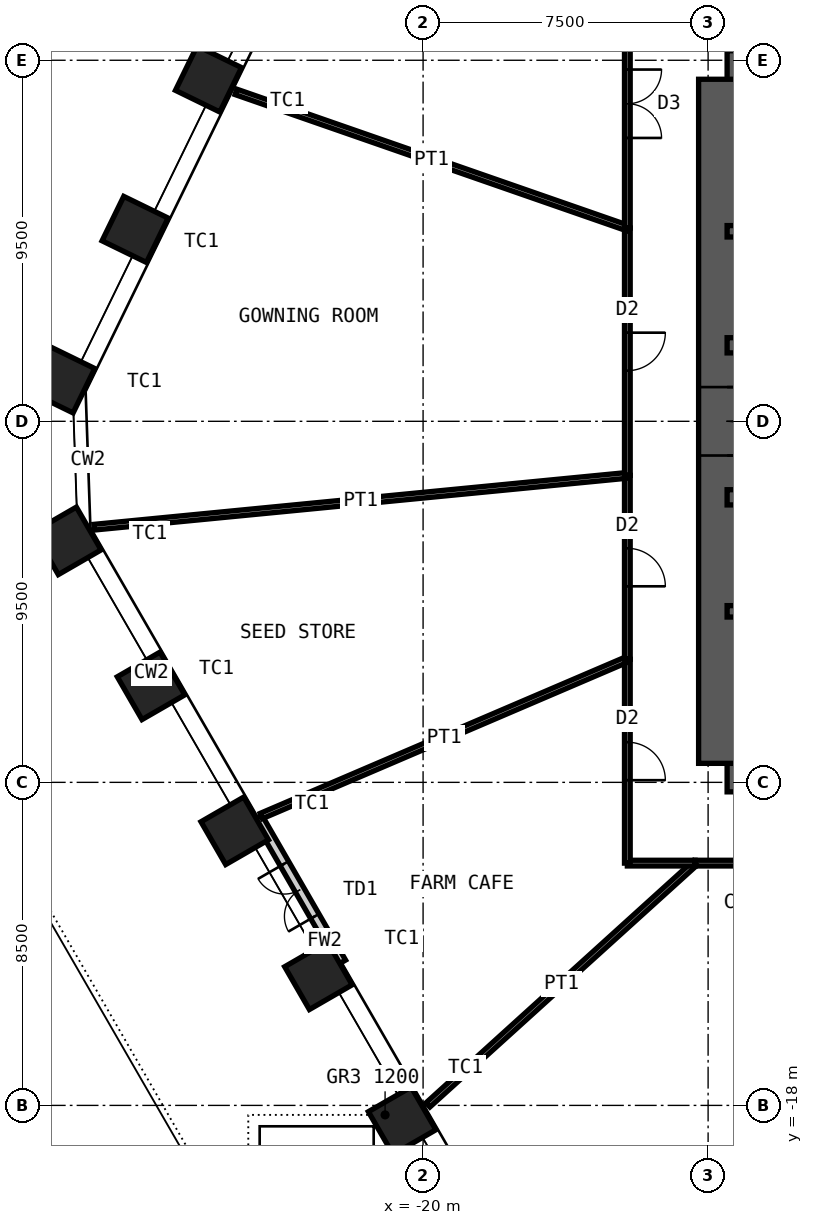
"""IFC4 building model, lengths in metres.
Left out: names, types, materials, properties, quantities, classifications, styles, units other than length and angle.
Written with IfcOpenShell. Run it as: python <this file> out.ifc"""

import sys

from ifc_helpers import new_model, si_unit, direction, frame, frame_2d, origin, origin_2d, place, context, subcontext, project, spatial, rectangle, hollow_rectangle, extrude, element, fill, save


model = new_model("IFC4")
c1 = context("Model", 3, precision=1e-05, world=origin(), true_north=direction((0.0, 1.0)))
c2 = subcontext(c1, "Body", "Model", "MODEL_VIEW")
j1 = project(units=[si_unit("LENGTHUNIT", "METRE"), si_unit("PLANEANGLEUNIT", "RADIAN")], contexts=[c1])
p1 = place(None, origin())
s1 = spatial("IfcSite", under=j1, at=p1, CompositionType="ELEMENT")
p2 = place(p1, origin())
s2 = spatial("IfcBuilding", under=s1, at=p2, CompositionType="ELEMENT")
p3 = place(p2, frame((0.0, 0.0, 17.0)))
s3 = spatial("IfcBuildingStorey", under=s2, at=p3, CompositionType="ELEMENT", Elevation=17.0)
for number, where, z_axis, x_axis in (
    (1, (-20.552, -18.404, 0.0), (0.0, 0.0, 1.0), (0.5, -0.866, 0.0)),
    (2, (-22.754, -14.589, 0.0), (0.0, 0.0, 1.0), (0.5, -0.866, 0.0)),
    (3, (-24.956, -10.775, 0.0), (0.0, 0.0, 1.0), (0.5, -0.866, 0.0)),
    (4, (-27.158, -6.96, 0.0), (0.0, 0.0, 1.0), (0.5, -0.866, 0.0)),
    (5, (-29.361, -3.146, 0.0), (0.0, 0.0, 1.0), (0.5, -0.866, 0.0)),
    (6, (-29.509, 1.09, 0.0), (0.0, 0.0, 1.0), (-0.438, -0.899, 0.0)),
    (7, (-27.578, 5.049, 0.0), (0.0, 0.0, 1.0), (-0.438, -0.899, 0.0)),
    (8, (-25.647, 9.008, 0.0), (0.0, 0.0, 1.0), (-0.438, -0.899, 0.0)),
):
    element("IfcColumn", number, at=place(p3, frame(where, z_axis=z_axis, x_axis=x_axis)), inside=s3, PredefinedType="COLUMN", context=c2, shape_type="SweptSolid", body=[
        extrude(hollow_rectangle(XDim=1.3, YDim=1.3, WallThickness=0.1, at=origin_2d()), origin(), (0.0, 0.0, 1.0), 5.0),
    ])
p4 = place(p3, frame((-12.0, 9.0, 0.0), z_axis=(0.0, 0.0, 1.0), x_axis=(1.0, 0.0, 0.0)))
e9 = element("IfcWall", 9, at=p4, inside=s3, PredefinedType="SHEAR", context=c2, shape_type="SweptSolid", body=[
    extrude(rectangle(XDim=24.0, YDim=1.5, at=frame_2d((12.0, 0.0))), origin(), (0.0, 0.0, 1.0), 5.0),
])
p5 = place(p4, frame((10.4, 0.0, 0.0)))
e10 = element("IfcOpeningElement", 10, at=p5, cuts=e9, PredefinedType="OPENING", context=c2, shape_type="SweptSolid", body=[
    extrude(rectangle(XDim=1.0, YDim=2.1, at=frame_2d((0.5, 1.05))), frame((0.0, 0.76, 0.0), z_axis=(0.0, -1.0, 0.0), x_axis=(1.0, 0.0, 0.0)), (0.0, 0.0, 1.0), 1.52),
])
p6 = place(p4, frame((17.6, 0.0, 0.0)))
e11 = element("IfcOpeningElement", 11, at=p6, cuts=e9, PredefinedType="OPENING", context=c2, shape_type="SweptSolid", body=[
    extrude(rectangle(XDim=0.9, YDim=2.1, at=frame_2d((0.45, 1.05))), frame((0.0, 0.76, 0.0), z_axis=(0.0, -1.0, 0.0), x_axis=(1.0, 0.0, 0.0)), (0.0, 0.0, 1.0), 1.52),
])
p7 = place(p4, frame((21.9, 0.0, 0.0)))
e12 = element("IfcOpeningElement", 12, at=p7, cuts=e9, PredefinedType="OPENING", context=c2, shape_type="SweptSolid", body=[
    extrude(rectangle(XDim=0.9, YDim=2.1, at=frame_2d((0.45, 1.05))), frame((0.0, 0.76, 0.0), z_axis=(0.0, -1.0, 0.0), x_axis=(1.0, 0.0, 0.0)), (0.0, 0.0, 1.0), 1.52),
])
p8 = place(p3, frame((-12.0, -9.0, 0.0), z_axis=(0.0, 0.0, 1.0), x_axis=(1.0, 0.0, 0.0)))
e13 = element("IfcWall", 13, at=p8, inside=s3, PredefinedType="SHEAR", context=c2, shape_type="SweptSolid", body=[
    extrude(rectangle(XDim=24.0, YDim=1.5, at=frame_2d((12.0, 0.0))), origin(), (0.0, 0.0, 1.0), 5.0),
])
p9 = place(p8, frame((1.35, 0.0, 0.0)))
e14 = element("IfcOpeningElement", 14, at=p9, cuts=e13, PredefinedType="OPENING", context=c2, shape_type="SweptSolid", body=[
    extrude(rectangle(XDim=1.0, YDim=2.1, at=frame_2d((0.5, 1.05))), frame((0.0, 0.76, 0.0), z_axis=(0.0, -1.0, 0.0), x_axis=(1.0, 0.0, 0.0)), (0.0, 0.0, 1.0), 1.52),
])
p10 = place(p8, frame((5.325, 0.0, 0.0)))
e15 = element("IfcOpeningElement", 15, at=p10, cuts=e13, PredefinedType="OPENING", context=c2, shape_type="SweptSolid", body=[
    extrude(rectangle(XDim=1.15, YDim=2.1, at=frame_2d((0.575, 1.05))), frame((0.0, 0.76, 0.0), z_axis=(0.0, -1.0, 0.0), x_axis=(1.0, 0.0, 0.0)), (0.0, 0.0, 1.0), 1.52),
])
p11 = place(p8, frame((12.6, 0.0, 0.0)))
e16 = element("IfcOpeningElement", 16, at=p11, cuts=e13, PredefinedType="OPENING", context=c2, shape_type="SweptSolid", body=[
    extrude(rectangle(XDim=1.0, YDim=2.1, at=frame_2d((0.5, 1.05))), frame((0.0, 0.76, 0.0), z_axis=(0.0, -1.0, 0.0), x_axis=(1.0, 0.0, 0.0)), (0.0, 0.0, 1.0), 1.52),
])
p12 = place(p3, frame((-12.0, -9.0, 0.0), z_axis=(0.0, 0.0, 1.0), x_axis=(0.0, 1.0, 0.0)))
e17 = element("IfcWall", 17, at=p12, inside=s3, PredefinedType="SHEAR", context=c2, shape_type="SweptSolid", body=[
    extrude(rectangle(XDim=18.0, YDim=1.5, at=frame_2d((9.0, 0.0))), origin(), (0.0, 0.0, 1.0), 5.0),
])
p13 = place(p12, frame((8.1, 0.0, 0.0)))
e18 = element("IfcOpeningElement", 18, at=p13, cuts=e17, PredefinedType="OPENING", context=c2, shape_type="SweptSolid", body=[
    extrude(rectangle(XDim=1.8, YDim=2.1, at=frame_2d((0.9, 1.05))), frame((0.0, 0.76, 0.0), z_axis=(0.0, -1.0, 0.0), x_axis=(1.0, 0.0, 0.0)), (0.0, 0.0, 1.0), 1.52),
])
p14 = place(p3, frame((-12.0, 5.0, 0.0), z_axis=(0.0, 0.0, 1.0), x_axis=(1.0, 0.0, 0.0)))
e19 = element("IfcWall", 19, at=p14, inside=s3, PredefinedType="SHEAR", context=c2, shape_type="SweptSolid", body=[
    extrude(rectangle(XDim=24.0, YDim=0.3, at=frame_2d((12.0, 0.0))), origin(), (0.0, 0.0, 1.0), 5.0),
])
p15 = place(p3, frame((-12.0, 2.0, 0.0), z_axis=(0.0, 0.0, 1.0), x_axis=(1.0, 0.0, 0.0)))
e20 = element("IfcWall", 20, at=p15, inside=s3, PredefinedType="SHEAR", context=c2, shape_type="SweptSolid", body=[
    extrude(rectangle(XDim=24.0, YDim=0.4, at=frame_2d((12.0, 0.0))), origin(), (0.0, 0.0, 1.0), 5.0),
])
p16 = place(p15, frame((2.4, 0.0, 0.0)))
e21 = element("IfcOpeningElement", 21, at=p16, cuts=e20, PredefinedType="OPENING", context=c2, shape_type="SweptSolid", body=[
    extrude(rectangle(XDim=1.1, YDim=2.1, at=frame_2d((0.55, 1.05))), frame((0.0, 0.21, 0.0), z_axis=(0.0, -1.0, 0.0), x_axis=(1.0, 0.0, 0.0)), (0.0, 0.0, 1.0), 0.42),
])
p17 = place(p15, frame((22.0, 0.0, 0.0)))
e22 = element("IfcOpeningElement", 22, at=p17, cuts=e20, PredefinedType="OPENING", context=c2, shape_type="SweptSolid", body=[
    extrude(rectangle(XDim=1.1, YDim=2.1, at=frame_2d((0.55, 1.05))), frame((0.0, 0.21, 0.0), z_axis=(0.0, -1.0, 0.0), x_axis=(1.0, 0.0, 0.0)), (0.0, 0.0, 1.0), 0.42),
])
p18 = place(p15, frame((10.15, 0.0, 0.0)))
e23 = element("IfcOpeningElement", 23, at=p18, cuts=e20, PredefinedType="OPENING", context=c2, shape_type="SweptSolid", body=[
    extrude(rectangle(XDim=1.0, YDim=2.1, at=frame_2d((0.5, 1.05))), frame((0.0, 0.21, 0.0), z_axis=(0.0, -1.0, 0.0), x_axis=(1.0, 0.0, 0.0)), (0.0, 0.0, 1.0), 0.42),
])
p19 = place(p15, frame((6.7, 0.0, 0.0)))
e24 = element("IfcOpeningElement", 24, at=p19, cuts=e20, PredefinedType="OPENING", context=c2, shape_type="SweptSolid", body=[
    extrude(rectangle(XDim=1.4, YDim=2.4, at=frame_2d((0.7, 1.2))), frame((0.0, 0.21, 0.0), z_axis=(0.0, -1.0, 0.0), x_axis=(1.0, 0.0, 0.0)), (0.0, 0.0, 1.0), 0.42),
])
p20 = place(p15, frame((13.35, 0.0, 0.0)))
e25 = element("IfcOpeningElement", 25, at=p20, cuts=e20, PredefinedType="OPENING", context=c2, shape_type="SweptSolid", body=[
    extrude(rectangle(XDim=1.1, YDim=2.4, at=frame_2d((0.55, 1.2))), frame((0.0, 0.21, 0.0), z_axis=(0.0, -1.0, 0.0), x_axis=(1.0, 0.0, 0.0)), (0.0, 0.0, 1.0), 0.42),
])
p21 = place(p15, frame((16.15, 0.0, 0.0)))
e26 = element("IfcOpeningElement", 26, at=p21, cuts=e20, PredefinedType="OPENING", context=c2, shape_type="SweptSolid", body=[
    extrude(rectangle(XDim=1.1, YDim=2.4, at=frame_2d((0.55, 1.2))), frame((0.0, 0.21, 0.0), z_axis=(0.0, -1.0, 0.0), x_axis=(1.0, 0.0, 0.0)), (0.0, 0.0, 1.0), 0.42),
])
p22 = place(p15, frame((18.95, 0.0, 0.0)))
e27 = element("IfcOpeningElement", 27, at=p22, cuts=e20, PredefinedType="OPENING", context=c2, shape_type="SweptSolid", body=[
    extrude(rectangle(XDim=1.1, YDim=2.4, at=frame_2d((0.55, 1.2))), frame((0.0, 0.21, 0.0), z_axis=(0.0, -1.0, 0.0), x_axis=(1.0, 0.0, 0.0)), (0.0, 0.0, 1.0), 0.42),
])
p23 = place(p3, frame((-12.0, -2.0, 0.0), z_axis=(0.0, 0.0, 1.0), x_axis=(1.0, 0.0, 0.0)))
e28 = element("IfcWall", 28, at=p23, inside=s3, PredefinedType="SHEAR", context=c2, shape_type="SweptSolid", body=[
    extrude(rectangle(XDim=24.0, YDim=0.4, at=frame_2d((12.0, 0.0))), origin(), (0.0, 0.0, 1.0), 5.0),
])
p24 = place(p23, frame((1.1, 0.0, 0.0)))
e29 = element("IfcOpeningElement", 29, at=p24, cuts=e28, PredefinedType="OPENING", context=c2, shape_type="SweptSolid", body=[
    extrude(rectangle(XDim=1.1, YDim=2.1, at=frame_2d((0.55, 1.05))), frame((0.0, 0.21, 0.0), z_axis=(0.0, -1.0, 0.0), x_axis=(1.0, 0.0, 0.0)), (0.0, 0.0, 1.0), 0.42),
])
p25 = place(p23, frame((13.55, 0.0, 0.0)))
e30 = element("IfcOpeningElement", 30, at=p25, cuts=e28, PredefinedType="OPENING", context=c2, shape_type="SweptSolid", body=[
    extrude(rectangle(XDim=1.1, YDim=2.1, at=frame_2d((0.55, 1.05))), frame((0.0, 0.21, 0.0), z_axis=(0.0, -1.0, 0.0), x_axis=(1.0, 0.0, 0.0)), (0.0, 0.0, 1.0), 0.42),
])
p26 = place(p23, frame((20.7, 0.0, 0.0)))
e31 = element("IfcOpeningElement", 31, at=p26, cuts=e28, PredefinedType="OPENING", context=c2, shape_type="SweptSolid", body=[
    extrude(rectangle(XDim=1.1, YDim=2.1, at=frame_2d((0.55, 1.05))), frame((0.0, 0.21, 0.0), z_axis=(0.0, -1.0, 0.0), x_axis=(1.0, 0.0, 0.0)), (0.0, 0.0, 1.0), 0.42),
])
p27 = place(p3, frame((-12.0, -5.0, 0.0), z_axis=(0.0, 0.0, 1.0), x_axis=(1.0, 0.0, 0.0)))
e32 = element("IfcWall", 32, at=p27, inside=s3, PredefinedType="SHEAR", context=c2, shape_type="SweptSolid", body=[
    extrude(rectangle(XDim=24.0, YDim=0.3, at=frame_2d((12.0, 0.0))), origin(), (0.0, 0.0, 1.0), 5.0),
])
p28 = place(p3, frame((-22.148, -14.239, 0.0), z_axis=(0.0, 0.0, 1.0), x_axis=(-0.499954356739, 0.86605175433, 0.0)))
e33 = element("IfcWall", 33, at=p28, inside=s3, PredefinedType="SOLIDWALL", context=c2, shape_type="SweptSolid", body=[
    extrude(rectangle(XDim=4.405, YDim=0.25, at=frame_2d((2.202, 0.0))), origin(), (0.0, 0.0, 1.0), 4.8),
])
p29 = place(p28, frame((1.402, 0.0, 0.0)))
e34 = element("IfcOpeningElement", 34, at=p29, cuts=e33, PredefinedType="OPENING", context=c2, shape_type="SweptSolid", body=[
    extrude(rectangle(XDim=1.6, YDim=2.4, at=frame_2d((0.8, 1.2))), frame((0.0, 0.135, 0.0), z_axis=(0.0, -1.0, 0.0), x_axis=(1.0, 0.0, 0.0)), (0.0, 0.0, 1.0), 0.27),
])
p30 = place(p3, frame((-12.56, -27.155, 0.0), z_axis=(0.0, 0.0, 1.0), x_axis=(0.419799104875, 0.907617051154, 0.0)))
e35 = element("IfcWall", 35, at=p30, inside=s3, PredefinedType="PARTITIONING", context=c2, shape_type="SweptSolid", body=[
    extrude(rectangle(XDim=17.11, YDim=0.15, at=frame_2d((8.555, 0.0))), origin(), (0.0, 0.0, 1.0), 3.7),
])
p31 = place(p3, frame((-5.377, -11.625, 0.0), z_axis=(0.0, 0.0, 1.0), x_axis=(-1.0, 0.0, 0.0)))
e36 = element("IfcWall", 36, at=p31, inside=s3, PredefinedType="PARTITIONING", context=c2, shape_type="SweptSolid", body=[
    extrude(rectangle(XDim=7.466, YDim=0.15, at=frame_2d((3.733, 0.0))), origin(), (0.0, 0.0, 1.0), 4.8),
])
p32 = place(p31, frame((3.233, 0.0, 0.0)))
e37 = element("IfcOpeningElement", 37, at=p32, cuts=e36, PredefinedType="OPENING", context=c2, shape_type="SweptSolid", body=[
    extrude(rectangle(XDim=1.0, YDim=2.4, at=frame_2d((0.5, 1.2))), frame((0.0, 0.085, 0.0), z_axis=(0.0, -1.0, 0.0), x_axis=(1.0, 0.0, 0.0)), (0.0, 0.0, 1.0), 0.17),
])
p33 = place(p3, frame((-19.871, -17.987, 0.0), z_axis=(0.0, 0.0, 1.0), x_axis=(0.741386887315, 0.671077851905, 0.0)))
e38 = element("IfcWall", 38, at=p33, inside=s3, PredefinedType="PARTITIONING", context=c2, shape_type="SweptSolid", body=[
    extrude(rectangle(XDim=9.48, YDim=0.15, at=frame_2d((4.74, 0.0))), origin(), (0.0, 0.0, 1.0), 3.7),
])
p34 = place(p3, frame((-12.843, -11.625, 0.0), z_axis=(0.0, 0.0, 1.0), x_axis=(-1.0, 0.0, 0.0)))
e39 = element("IfcWall", 39, at=p34, inside=s3, PredefinedType="PARTITIONING", context=c2, shape_type="SweptSolid", body=[
    extrude(rectangle(XDim=1.782, YDim=0.15, at=frame_2d((0.891, 0.0))), origin(), (0.0, 0.0, 1.0), 4.8),
])
p35 = place(p3, frame((-14.625, -11.625, 0.0), z_axis=(0.0, 0.0, 1.0), x_axis=(0.0, 1.0, 0.0)))
e40 = element("IfcWall", 40, at=p35, inside=s3, PredefinedType="PARTITIONING", context=c2, shape_type="SweptSolid", body=[
    extrude(rectangle(XDim=5.364, YDim=0.15, at=frame_2d((2.682, 0.0))), origin(), (0.0, 0.0, 1.0), 4.8),
])
p36 = place(p35, frame((2.182, 0.0, 0.0)))
e41 = element("IfcOpeningElement", 41, at=p36, cuts=e40, PredefinedType="OPENING", context=c2, shape_type="SweptSolid", body=[
    extrude(rectangle(XDim=1.0, YDim=2.4, at=frame_2d((0.5, 1.2))), frame((0.0, 0.085, 0.0), z_axis=(0.0, -1.0, 0.0), x_axis=(1.0, 0.0, 0.0)), (0.0, 0.0, 1.0), 0.17),
])
p37 = place(p3, frame((-24.258, -10.385, 0.0), z_axis=(0.0, 0.0, 1.0), x_axis=(0.919298009201, 0.393562155547, 0.0)))
e42 = element("IfcWall", 42, at=p37, inside=s3, PredefinedType="PARTITIONING", context=c2, shape_type="SweptSolid", body=[
    extrude(rectangle(XDim=10.479, YDim=0.15, at=frame_2d((5.239, 0.0))), origin(), (0.0, 0.0, 1.0), 3.7),
])
p38 = place(p3, frame((-14.625, -6.261, 0.0), z_axis=(0.0, 0.0, 1.0), x_axis=(0.0, 1.0, 0.0)))
e43 = element("IfcWall", 43, at=p38, inside=s3, PredefinedType="PARTITIONING", context=c2, shape_type="SweptSolid", body=[
    extrude(rectangle(XDim=4.839, YDim=0.15, at=frame_2d((2.42, 0.0))), origin(), (0.0, 0.0, 1.0), 4.8),
])
p39 = place(p38, frame((1.92, 0.0, 0.0)))
e44 = element("IfcOpeningElement", 44, at=p39, cuts=e43, PredefinedType="OPENING", context=c2, shape_type="SweptSolid", body=[
    extrude(rectangle(XDim=1.0, YDim=2.4, at=frame_2d((0.5, 1.2))), frame((0.0, 0.085, 0.0), z_axis=(0.0, -1.0, 0.0), x_axis=(1.0, 0.0, 0.0)), (0.0, 0.0, 1.0), 0.17),
])
p40 = place(p3, frame((-28.655, -2.786, 0.0), z_axis=(0.0, 0.0, 1.0), x_axis=(0.995307277605, 0.096764782571, 0.0)))
e45 = element("IfcWall", 45, at=p40, inside=s3, PredefinedType="PARTITIONING", context=c2, shape_type="SweptSolid", body=[
    extrude(rectangle(XDim=14.096, YDim=0.15, at=frame_2d((7.048, 0.0))), origin(), (0.0, 0.0, 1.0), 3.7),
])
p41 = place(p3, frame((-14.625, -1.422, 0.0), z_axis=(0.0, 0.0, 1.0), x_axis=(0.0, 1.0, 0.0)))
e46 = element("IfcWall", 46, at=p41, inside=s3, PredefinedType="PARTITIONING", context=c2, shape_type="SweptSolid", body=[
    extrude(rectangle(XDim=6.508, YDim=0.15, at=frame_2d((3.254, 0.0))), origin(), (0.0, 0.0, 1.0), 4.8),
])
p42 = place(p41, frame((2.754, 0.0, 0.0)))
e47 = element("IfcOpeningElement", 47, at=p42, cuts=e46, PredefinedType="OPENING", context=c2, shape_type="SweptSolid", body=[
    extrude(rectangle(XDim=1.0, YDim=2.4, at=frame_2d((0.5, 1.2))), frame((0.0, 0.085, 0.0), z_axis=(0.0, -1.0, 0.0), x_axis=(1.0, 0.0, 0.0)), (0.0, 0.0, 1.0), 0.17),
])
p43 = place(p3, frame((-24.923, 8.668, 0.0), z_axis=(0.0, 0.0, 1.0), x_axis=(0.944503744172, -0.328500650295, 0.0)))
e48 = element("IfcWall", 48, at=p43, inside=s3, PredefinedType="PARTITIONING", context=c2, shape_type="SweptSolid", body=[
    extrude(rectangle(XDim=10.903, YDim=0.15, at=frame_2d((5.452, 0.0))), origin(), (0.0, 0.0, 1.0), 3.7),
])
p44 = place(p3, frame((-14.625, 5.086, 0.0), z_axis=(0.0, 0.0, 1.0), x_axis=(0.0, 1.0, 0.0)))
e49 = element("IfcWall", 49, at=p44, inside=s3, PredefinedType="PARTITIONING", context=c2, shape_type="SweptSolid", body=[
    extrude(rectangle(XDim=6.539, YDim=0.15, at=frame_2d((3.27, 0.0))), origin(), (0.0, 0.0, 1.0), 4.8),
])
p45 = place(p44, frame((2.369, 0.0, 0.0)))
e50 = element("IfcOpeningElement", 50, at=p45, cuts=e49, PredefinedType="OPENING", context=c2, shape_type="SweptSolid", body=[
    extrude(rectangle(XDim=1.8, YDim=2.4, at=frame_2d((0.9, 1.2))), frame((0.0, 0.085, 0.0), z_axis=(0.0, -1.0, 0.0), x_axis=(1.0, 0.0, 0.0)), (0.0, 0.0, 1.0), 0.17),
])
p46 = place(p29, origin())
e51 = element("IfcDoor", 51, at=p46, inside=s3, OperationType="DOUBLE_DOOR_DOUBLE_SWING", PredefinedType="DOOR", context=c2, shape_type="SweptSolid", body=[
    extrude(rectangle(XDim=1.6, YDim=2.4, at=frame_2d((0.8, 1.2))), frame((0.0, 0.025, 0.0), z_axis=(0.0, -1.0, 0.0), x_axis=(1.0, 0.0, 0.0)), (0.0, 0.0, 1.0), 0.05),
])
fill(e34, e51)
p47 = place(p13, origin())
e52 = element("IfcDoor", 52, at=p47, inside=s3, OperationType="DOUBLE_DOOR_DOUBLE_SWING", PredefinedType="DOOR", context=c2, shape_type="SweptSolid", body=[
    extrude(rectangle(XDim=1.8, YDim=2.1, at=frame_2d((0.9, 1.05))), frame((0.0, 0.025, 0.0), z_axis=(0.0, -1.0, 0.0), x_axis=(1.0, 0.0, 0.0)), (0.0, 0.0, 1.0), 0.05),
])
fill(e18, e52)
p48 = place(p36, origin())
e53 = element("IfcDoor", 53, at=p48, inside=s3, OperationType="SINGLE_SWING_LEFT", PredefinedType="DOOR", context=c2, shape_type="SweptSolid", body=[
    extrude(rectangle(XDim=1.0, YDim=2.4, at=frame_2d((0.5, 1.2))), frame((0.0, 0.025, 0.0), z_axis=(0.0, -1.0, 0.0), x_axis=(1.0, 0.0, 0.0)), (0.0, 0.0, 1.0), 0.05),
])
fill(e41, e53)
p49 = place(p39, origin())
e54 = element("IfcDoor", 54, at=p49, inside=s3, OperationType="SINGLE_SWING_LEFT", PredefinedType="DOOR", context=c2, shape_type="SweptSolid", body=[
    extrude(rectangle(XDim=1.0, YDim=2.4, at=frame_2d((0.5, 1.2))), frame((0.0, 0.025, 0.0), z_axis=(0.0, -1.0, 0.0), x_axis=(1.0, 0.0, 0.0)), (0.0, 0.0, 1.0), 0.05),
])
fill(e44, e54)
p50 = place(p42, origin())
e55 = element("IfcDoor", 55, at=p50, inside=s3, OperationType="SINGLE_SWING_RIGHT", PredefinedType="DOOR", context=c2, shape_type="SweptSolid", body=[
    extrude(rectangle(XDim=1.0, YDim=2.4, at=frame_2d((0.5, 1.2))), frame((0.0, 0.025, 0.0), z_axis=(0.0, -1.0, 0.0), x_axis=(1.0, 0.0, 0.0)), (0.0, 0.0, 1.0), 0.05),
])
fill(e47, e55)
p51 = place(p45, origin())
e56 = element("IfcDoor", 56, at=p51, inside=s3, OperationType="DOUBLE_DOOR_DOUBLE_SWING", PredefinedType="DOOR", context=c2, shape_type="SweptSolid", body=[
    extrude(rectangle(XDim=1.8, YDim=2.4, at=frame_2d((0.9, 1.2))), frame((0.0, 0.025, 0.0), z_axis=(0.0, -1.0, 0.0), x_axis=(1.0, 0.0, 0.0)), (0.0, 0.0, 1.0), 0.05),
])
fill(e50, e56)
p52 = place(p3, frame((0.0, 0.0, -0.3)))
p53 = place(p52, frame((-22.8, -19.75, 0.0)))
p54 = place(p53, frame((0.0, 0.0, 0.25)))
e57 = element("IfcWindow", 57, at=p54, inside=s3, PartitioningType="SINGLE_PANEL", PredefinedType="SKYLIGHT", context=c2, shape_type="SweptSolid", body=[
    extrude(rectangle(XDim=3.0, YDim=2.4, at=origin_2d()), origin(), (0.0, 0.0, 1.0), 0.05),
])
save(model, sys.argv[1])
